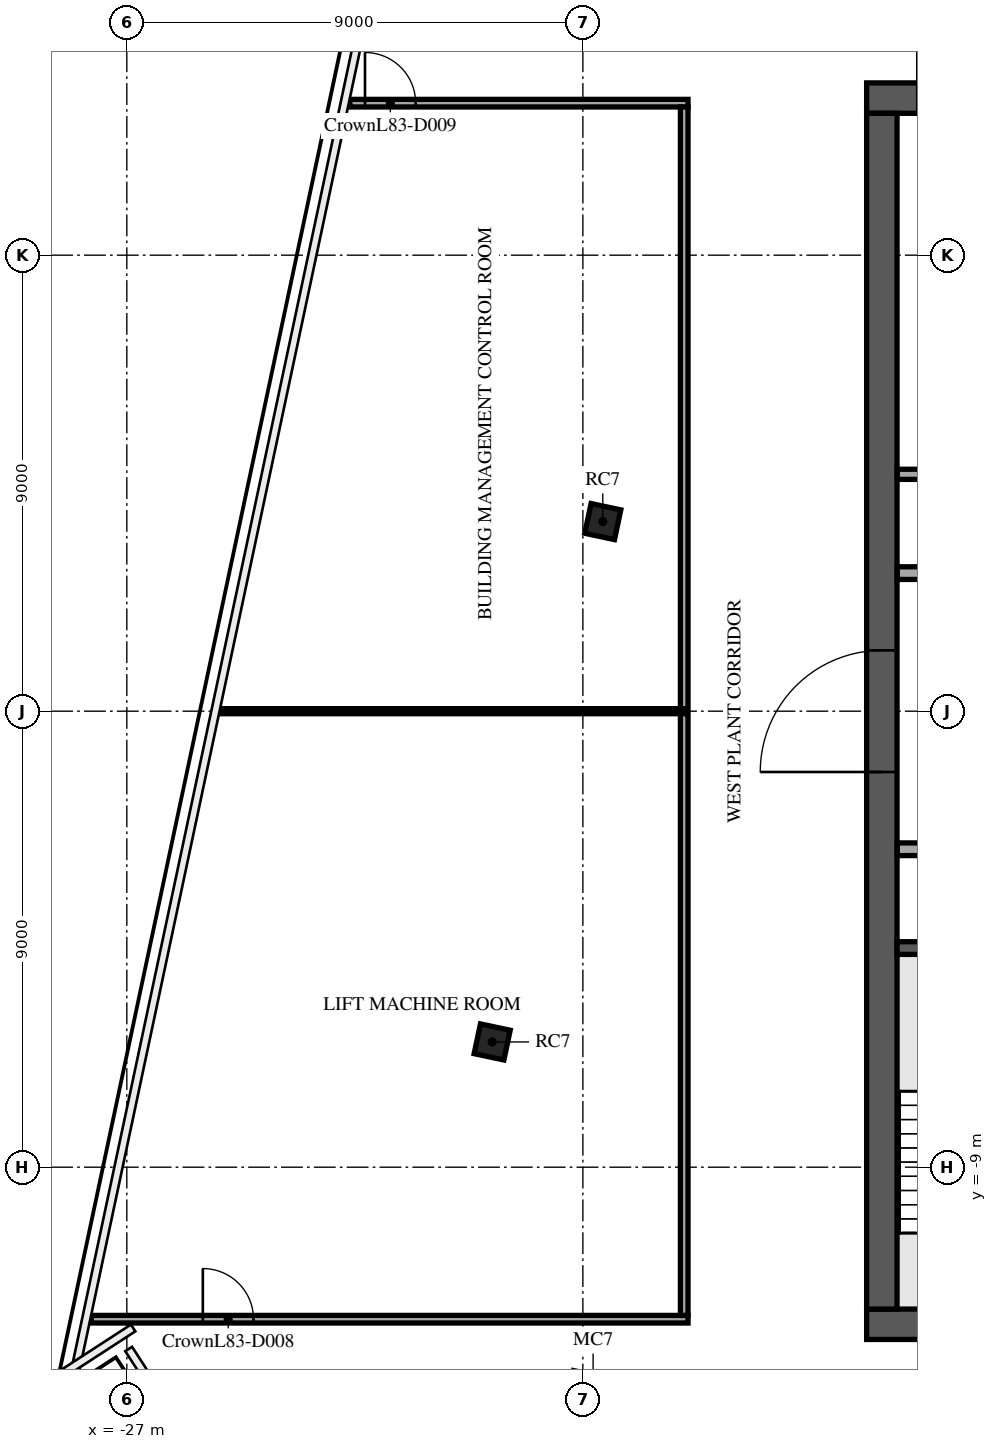
"""IFC4 building model, lengths in metres.
Left out: names, types, materials, properties, quantities, classifications, styles, units other than length and angle.
Written with IfcOpenShell. Run it as: python <this file> out.ifc"""

import sys

from ifc_helpers import new_model, si_unit, direction, frame, frame_2d, origin, origin_2d, place, context, subcontext, project, spatial, rectangle, extrude, element, fill, save


model = new_model("IFC4")
c1 = context("Model", 3, precision=1e-05, world=origin(), true_north=direction((0.0, 1.0)))
c2 = subcontext(c1, "Body", "Model", "MODEL_VIEW")
j1 = project(units=[si_unit("LENGTHUNIT", "METRE"), si_unit("PLANEANGLEUNIT", "RADIAN")], contexts=[c1])
p1 = place(None, origin())
s1 = spatial("IfcSite", under=j1, at=p1, CompositionType="ELEMENT")
p2 = place(p1, origin())
s2 = spatial("IfcBuilding", under=s1, at=p2, CompositionType="ELEMENT")
p3 = place(p2, frame((0.0, 0.0, 350.1)))
s3 = spatial("IfcBuildingStorey", under=s2, at=p3, CompositionType="ELEMENT", Elevation=350.1)
for number, where, z_axis, x_axis in (
    (1, (-17.607, 3.742, -0.3), (0.0, 0.0, 1.0), (0.208, 0.978, 0.0)),
    (2, (-19.79, -6.528, -0.3), (0.0, 0.0, 1.0), (0.208, 0.978, 0.0)),
):
    element("IfcColumn", number, at=place(p3, frame(where, z_axis=z_axis, x_axis=x_axis)), inside=s3, PredefinedType="COLUMN", context=c2, shape_type="SweptSolid", body=[
        extrude(rectangle(XDim=0.6, YDim=0.6, at=origin_2d()), origin(), (0.0, 0.0, 1.0), 8.3),
    ])
p4 = place(p3, frame((-12.4, 12.1, 0.0), z_axis=(0.0, 0.0, 1.0), x_axis=(1.0, 0.0, 0.0)))
e3 = element("IfcWall", 3, at=p4, inside=s3, PredefinedType="SHEAR", context=c2, shape_type="SweptSolid", body=[
    extrude(rectangle(XDim=24.8, YDim=0.6, at=frame_2d((12.4, 0.0))), origin(), (0.0, 0.0, 1.0), 7.7),
])
p5 = place(p4, frame((11.2, 0.0, 0.0)))
e4 = element("IfcOpeningElement", 4, at=p5, cuts=e3, PredefinedType="OPENING", context=c2, shape_type="SweptSolid", body=[
    extrude(rectangle(XDim=2.4, YDim=2.4, at=frame_2d((1.2, 1.2))), frame((0.0, 0.31, 0.0), z_axis=(0.0, -1.0, 0.0), x_axis=(1.0, 0.0, 0.0)), (0.0, 0.0, 1.0), 0.62),
])
p6 = place(p4, frame((22.025, 0.0, 0.0)))
e5 = element("IfcOpeningElement", 5, at=p6, cuts=e3, PredefinedType="OPENING", context=c2, shape_type="SweptSolid", body=[
    extrude(rectangle(XDim=1.2, YDim=2.1, at=frame_2d((0.6, 1.05))), frame((0.0, 0.31, 0.0), z_axis=(0.0, -1.0, 0.0), x_axis=(1.0, 0.0, 0.0)), (0.0, 0.0, 1.0), 0.62),
])
p7 = place(p4, frame((1.0, 0.0, 0.0)))
e6 = element("IfcOpeningElement", 6, at=p7, cuts=e3, PredefinedType="OPENING", context=c2, shape_type="SweptSolid", body=[
    extrude(rectangle(XDim=1.0, YDim=2.1, at=frame_2d((0.5, 1.05))), frame((0.0, 0.31, 0.0), z_axis=(0.0, -1.0, 0.0), x_axis=(1.0, 0.0, 0.0)), (0.0, 0.0, 1.0), 0.62),
])
p8 = place(p3, frame((-12.4, -12.1, 0.0), z_axis=(0.0, 0.0, 1.0), x_axis=(1.0, 0.0, 0.0)))
e7 = element("IfcWall", 7, at=p8, inside=s3, PredefinedType="SHEAR", context=c2, shape_type="SweptSolid", body=[
    extrude(rectangle(XDim=24.8, YDim=0.6, at=frame_2d((12.4, 0.0))), origin(), (0.0, 0.0, 1.0), 7.7),
])
p9 = place(p8, frame((7.3, 0.0, 0.0)))
e8 = element("IfcOpeningElement", 8, at=p9, cuts=e7, PredefinedType="OPENING", context=c2, shape_type="SweptSolid", body=[
    extrude(rectangle(XDim=2.0, YDim=2.1, at=frame_2d((1.0, 1.05))), frame((0.0, 0.31, 0.0), z_axis=(0.0, -1.0, 0.0), x_axis=(1.0, 0.0, 0.0)), (0.0, 0.0, 1.0), 0.62),
])
p10 = place(p8, frame((17.425, 0.0, 0.0)))
e9 = element("IfcOpeningElement", 9, at=p10, cuts=e7, PredefinedType="OPENING", context=c2, shape_type="SweptSolid", body=[
    extrude(rectangle(XDim=1.2, YDim=2.1, at=frame_2d((0.6, 1.05))), frame((0.0, 0.31, 0.0), z_axis=(0.0, -1.0, 0.0), x_axis=(1.0, 0.0, 0.0)), (0.0, 0.0, 1.0), 0.62),
])
p11 = place(p8, frame((1.575, 0.0, 0.0)))
e10 = element("IfcOpeningElement", 10, at=p11, cuts=e7, PredefinedType="OPENING", context=c2, shape_type="SweptSolid", body=[
    extrude(rectangle(XDim=1.2, YDim=2.1, at=frame_2d((0.6, 1.05))), frame((0.0, 0.31, 0.0), z_axis=(0.0, -1.0, 0.0), x_axis=(1.0, 0.0, 0.0)), (0.0, 0.0, 1.0), 0.62),
])
p12 = place(p8, frame((22.025, 0.0, 0.0)))
e11 = element("IfcOpeningElement", 11, at=p12, cuts=e7, PredefinedType="OPENING", context=c2, shape_type="SweptSolid", body=[
    extrude(rectangle(XDim=1.2, YDim=2.1, at=frame_2d((0.6, 1.05))), frame((0.0, 0.31, 0.0), z_axis=(0.0, -1.0, 0.0), x_axis=(1.0, 0.0, 0.0)), (0.0, 0.0, 1.0), 0.62),
])
p13 = place(p3, frame((-12.1, -11.8, 0.0), z_axis=(0.0, 0.0, 1.0), x_axis=(0.0, 1.0, 0.0)))
e12 = element("IfcWall", 12, at=p13, inside=s3, PredefinedType="SHEAR", context=c2, shape_type="SweptSolid", body=[
    extrude(rectangle(XDim=23.6, YDim=0.6, at=frame_2d((11.8, 0.0))), origin(), (0.0, 0.0, 1.0), 7.7),
])
p14 = place(p13, frame((10.6, 0.0, 0.0)))
e13 = element("IfcOpeningElement", 13, at=p14, cuts=e12, PredefinedType="OPENING", context=c2, shape_type="SweptSolid", body=[
    extrude(rectangle(XDim=2.4, YDim=2.4, at=frame_2d((1.2, 1.2))), frame((0.0, 0.31, 0.0), z_axis=(0.0, -1.0, 0.0), x_axis=(1.0, 0.0, 0.0)), (0.0, 0.0, 1.0), 0.62),
])
p15 = place(p3, frame((-8.65, -4.675, 0.0), z_axis=(0.0, 0.0, 1.0), x_axis=(-1.0, 0.0, 0.0)))
e14 = element("IfcWall", 14, at=p15, inside=s3, PredefinedType="SOLIDWALL", context=c2, shape_type="SweptSolid", body=[
    extrude(rectangle(XDim=3.15, YDim=0.25, at=frame_2d((1.575, 0.0))), origin(), (0.0, 0.0, 1.0), 7.7),
])
p16 = place(p3, frame((-11.795, -2.725, 0.0), z_axis=(0.0, 0.0, 1.0), x_axis=(1.0, 0.0, 0.0)))
e15 = element("IfcWall", 15, at=p16, inside=s3, PredefinedType="PARTITIONING", context=c2, shape_type="SweptSolid", body=[
    extrude(rectangle(XDim=14.415, YDim=0.25, at=frame_2d((7.208, 0.0))), origin(), (0.0, 0.0, 1.0), 7.7),
])
p17 = place(p16, frame((1.295, 0.0, 0.0)))
e16 = element("IfcOpeningElement", 16, at=p17, cuts=e15, PredefinedType="OPENING", context=c2, shape_type="SweptSolid", body=[
    extrude(rectangle(XDim=1.0, YDim=2.1, at=frame_2d((0.5, 1.05))), frame((0.0, 0.135, 0.0), z_axis=(0.0, -1.0, 0.0), x_axis=(1.0, 0.0, 0.0)), (0.0, 0.0, 1.0), 0.27),
])
p18 = place(p16, frame((4.42, 0.0, 0.0)))
e17 = element("IfcOpeningElement", 17, at=p18, cuts=e15, PredefinedType="OPENING", context=c2, shape_type="SweptSolid", body=[
    extrude(rectangle(XDim=1.0, YDim=2.1, at=frame_2d((0.5, 1.05))), frame((0.0, 0.135, 0.0), z_axis=(0.0, -1.0, 0.0), x_axis=(1.0, 0.0, 0.0)), (0.0, 0.0, 1.0), 0.27),
])
p19 = place(p16, frame((9.92, 0.0, 0.0)))
e18 = element("IfcOpeningElement", 18, at=p19, cuts=e15, PredefinedType="OPENING", context=c2, shape_type="SweptSolid", body=[
    extrude(rectangle(XDim=1.0, YDim=2.1, at=frame_2d((0.5, 1.05))), frame((0.0, 0.135, 0.0), z_axis=(0.0, -1.0, 0.0), x_axis=(1.0, 0.0, 0.0)), (0.0, 0.0, 1.0), 0.27),
])
p20 = place(p3, frame((-11.795, 2.725, 0.0), z_axis=(0.0, 0.0, 1.0), x_axis=(1.0, 0.0, 0.0)))
e19 = element("IfcWall", 19, at=p20, inside=s3, PredefinedType="PARTITIONING", context=c2, shape_type="SweptSolid", body=[
    extrude(rectangle(XDim=23.59, YDim=0.25, at=frame_2d((11.795, 0.0))), origin(), (0.0, 0.0, 1.0), 7.7),
])
p21 = place(p20, frame((21.345, 0.0, 0.0)))
e20 = element("IfcOpeningElement", 20, at=p21, cuts=e19, PredefinedType="OPENING", context=c2, shape_type="SweptSolid", body=[
    extrude(rectangle(XDim=0.9, YDim=2.1, at=frame_2d((0.45, 1.05))), frame((0.0, 0.135, 0.0), z_axis=(0.0, -1.0, 0.0), x_axis=(1.0, 0.0, 0.0)), (0.0, 0.0, 1.0), 0.27),
])
p22 = place(p20, frame((1.345, 0.0, 0.0)))
e21 = element("IfcOpeningElement", 21, at=p22, cuts=e19, PredefinedType="OPENING", context=c2, shape_type="SweptSolid", body=[
    extrude(rectangle(XDim=0.9, YDim=2.1, at=frame_2d((0.45, 1.05))), frame((0.0, 0.135, 0.0), z_axis=(0.0, -1.0, 0.0), x_axis=(1.0, 0.0, 0.0)), (0.0, 0.0, 1.0), 0.27),
])
p23 = place(p20, frame((4.42, 0.0, 0.0)))
e22 = element("IfcOpeningElement", 22, at=p23, cuts=e19, PredefinedType="OPENING", context=c2, shape_type="SweptSolid", body=[
    extrude(rectangle(XDim=1.0, YDim=2.1, at=frame_2d((0.5, 1.05))), frame((0.0, 0.135, 0.0), z_axis=(0.0, -1.0, 0.0), x_axis=(1.0, 0.0, 0.0)), (0.0, 0.0, 1.0), 0.27),
])
p24 = place(p20, frame((7.17, 0.0, 0.0)))
e23 = element("IfcOpeningElement", 23, at=p24, cuts=e19, PredefinedType="OPENING", context=c2, shape_type="SweptSolid", body=[
    extrude(rectangle(XDim=1.0, YDim=2.1, at=frame_2d((0.5, 1.05))), frame((0.0, 0.135, 0.0), z_axis=(0.0, -1.0, 0.0), x_axis=(1.0, 0.0, 0.0)), (0.0, 0.0, 1.0), 0.27),
])
p25 = place(p20, frame((12.57, 0.0, 0.0)))
e24 = element("IfcOpeningElement", 24, at=p25, cuts=e19, PredefinedType="OPENING", context=c2, shape_type="SweptSolid", body=[
    extrude(rectangle(XDim=1.2, YDim=2.1, at=frame_2d((0.6, 1.05))), frame((0.0, 0.135, 0.0), z_axis=(0.0, -1.0, 0.0), x_axis=(1.0, 0.0, 0.0)), (0.0, 0.0, 1.0), 0.27),
])
p26 = place(p3, frame((-11.795, 4.675, 0.0), z_axis=(0.0, 0.0, 1.0), x_axis=(1.0, 0.0, 0.0)))
e25 = element("IfcWall", 25, at=p26, inside=s3, PredefinedType="PARTITIONING", context=c2, shape_type="SweptSolid", body=[
    extrude(rectangle(XDim=3.645, YDim=0.2, at=frame_2d((1.823, 0.0))), origin(), (0.0, 0.0, 1.0), 7.7),
])
p27 = place(p3, frame((-27.7, -12.0, 0.0), z_axis=(0.0, 0.0, 1.0), x_axis=(1.0, 0.0, 0.0)))
e26 = element("IfcWall", 26, at=p27, inside=s3, PredefinedType="PARTITIONING", context=c2, shape_type="SweptSolid", body=[
    extrude(rectangle(XDim=11.775, YDim=0.15, at=frame_2d((5.888, 0.0))), origin(), (0.0, 0.0, 1.0), 7.7),
])
p28 = place(p27, frame((2.2, 0.0, 0.0)))
e27 = element("IfcOpeningElement", 27, at=p28, cuts=e26, PredefinedType="OPENING", context=c2, shape_type="SweptSolid", body=[
    extrude(rectangle(XDim=1.0, YDim=2.1, at=frame_2d((0.5, 1.05))), frame((0.0, 0.085, 0.0), z_axis=(0.0, -1.0, 0.0), x_axis=(1.0, 0.0, 0.0)), (0.0, 0.0, 1.0), 0.17),
])
p29 = place(p3, frame((-25.15, 0.0, 0.0), z_axis=(0.0, 0.0, 1.0), x_axis=(1.0, 0.0, 0.0)))
e28 = element("IfcWall", 28, at=p29, inside=s3, PredefinedType="PARTITIONING", context=c2, shape_type="SweptSolid", body=[
    extrude(rectangle(XDim=9.075, YDim=0.1, at=frame_2d((4.537, 0.0))), origin(), (0.0, 0.0, 1.0), 7.7),
])
p30 = place(p3, frame((-22.599, 12.0, 0.0), z_axis=(0.0, 0.0, 1.0), x_axis=(1.0, 0.0, 0.0)))
e29 = element("IfcWall", 29, at=p30, inside=s3, PredefinedType="PARTITIONING", context=c2, shape_type="SweptSolid", body=[
    extrude(rectangle(XDim=6.674, YDim=0.15, at=frame_2d((3.337, 0.0))), origin(), (0.0, 0.0, 1.0), 7.7),
])
p31 = place(p30, frame((0.299, 0.0, 0.0)))
e30 = element("IfcOpeningElement", 30, at=p31, cuts=e29, PredefinedType="OPENING", context=c2, shape_type="SweptSolid", body=[
    extrude(rectangle(XDim=1.0, YDim=2.1, at=frame_2d((0.5, 1.05))), frame((0.0, 0.085, 0.0), z_axis=(0.0, -1.0, 0.0), x_axis=(1.0, 0.0, 0.0)), (0.0, 0.0, 1.0), 0.17),
])
p32 = place(p3, frame((-16.0, -11.925, 0.0), z_axis=(0.0, 0.0, 1.0), x_axis=(0.0, 1.0, 0.0)))
e31 = element("IfcWall", 31, at=p32, inside=s3, PredefinedType="PARTITIONING", context=c2, shape_type="SweptSolid", body=[
    extrude(rectangle(XDim=11.875, YDim=0.15, at=frame_2d((5.938, 0.0))), origin(), (0.0, 0.0, 1.0), 7.7),
])
p33 = place(p3, frame((-16.0, 0.05, 0.0), z_axis=(0.0, 0.0, 1.0), x_axis=(0.0, 1.0, 0.0)))
e32 = element("IfcWall", 32, at=p33, inside=s3, PredefinedType="PARTITIONING", context=c2, shape_type="SweptSolid", body=[
    extrude(rectangle(XDim=11.875, YDim=0.15, at=frame_2d((5.938, 0.0))), origin(), (0.0, 0.0, 1.0), 7.32),
])
p34 = place(p14, origin())
e33 = element("IfcDoor", 33, at=p34, inside=s3, OperationType="SINGLE_SWING_LEFT", PredefinedType="DOOR", context=c2, shape_type="SweptSolid", body=[
    extrude(rectangle(XDim=2.4, YDim=2.4, at=frame_2d((1.2, 1.2))), frame((0.0, 0.025, 0.0), z_axis=(0.0, -1.0, 0.0), x_axis=(1.0, 0.0, 0.0)), (0.0, 0.0, 1.0), 0.05),
])
fill(e13, e33)
p35 = place(p28, origin())
e34 = element("IfcDoor", 34, at=p35, inside=s3, OperationType="SINGLE_SWING_RIGHT", PredefinedType="DOOR", context=c2, shape_type="SweptSolid", body=[
    extrude(rectangle(XDim=1.0, YDim=2.1, at=frame_2d((0.5, 1.05))), frame((0.0, 0.025, 0.0), z_axis=(0.0, -1.0, 0.0), x_axis=(1.0, 0.0, 0.0)), (0.0, 0.0, 1.0), 0.05),
])
fill(e27, e34)
p36 = place(p31, origin())
e35 = element("IfcDoor", 35, at=p36, inside=s3, OperationType="SINGLE_SWING_LEFT", PredefinedType="DOOR", context=c2, shape_type="SweptSolid", body=[
    extrude(rectangle(XDim=1.0, YDim=2.1, at=frame_2d((0.5, 1.05))), frame((0.0, 0.025, 0.0), z_axis=(0.0, -1.0, 0.0), x_axis=(1.0, 0.0, 0.0)), (0.0, 0.0, 1.0), 0.05),
])
fill(e30, e35)
save(model, sys.argv[1])
